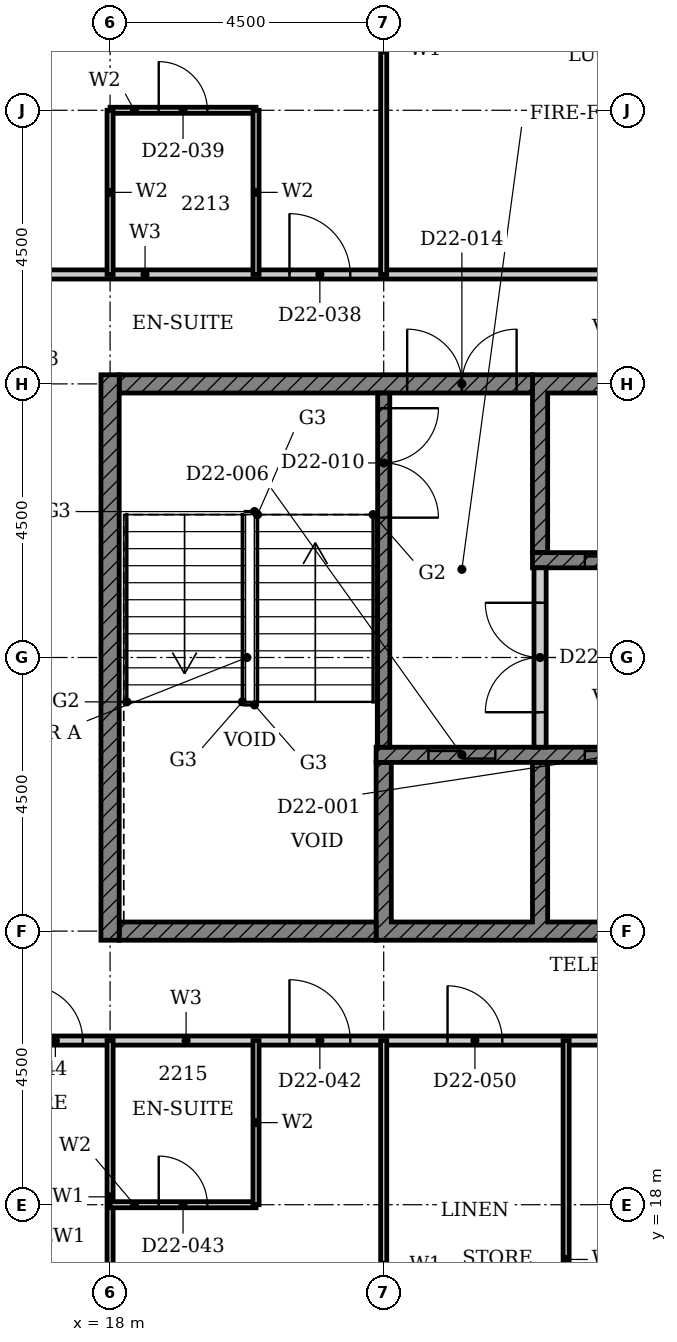
"""IFC4 building model, lengths in metres.
Left out: names, types, materials, properties, quantities, classifications, styles, units other than length and angle.
Written with IfcOpenShell. Run it as: python <this file> out.ifc"""

import sys

from ifc_helpers import new_model, si_unit, direction, frame, frame_2d, origin, place, context, subcontext, project, spatial, polyline, rectangle, outline, extrude, element, fill, save


model = new_model("IFC4")
c1 = context("Model", 3, precision=1e-05, world=origin(), true_north=direction((0.0, 1.0)))
c2 = subcontext(c1, "Body", "Model", "MODEL_VIEW")
j1 = project(units=[si_unit("LENGTHUNIT", "METRE"), si_unit("PLANEANGLEUNIT", "RADIAN")], contexts=[c1])
p1 = place(None, origin())
s1 = spatial("IfcSite", under=j1, at=p1, CompositionType="ELEMENT")
p2 = place(p1, origin())
s2 = spatial("IfcBuilding", under=s1, at=p2, CompositionType="ELEMENT")
p3 = place(p2, frame((0.0, 0.0, 92.4)))
s3 = spatial("IfcBuildingStorey", under=s2, at=p3, CompositionType="ELEMENT", Elevation=92.4)
p4 = place(p3, origin())
e1 = element("IfcWall", 1, at=p4, inside=s3, PredefinedType="SHEAR", context=c2, shape_type="SweptSolid", body=[
    extrude(outline(polyline([(22.375, 22.35), (38.053, 22.35), (38.053, 25.275), (37.803, 25.275), (37.803, 22.65), (35.482, 22.65), (35.482, 25.275), (35.232, 25.275), (35.232, 22.65), (32.911, 22.65), (32.911, 25.275), (32.661, 25.275), (32.661, 22.65), (30.339, 22.65), (30.339, 25.275), (30.089, 25.275), (30.089, 22.65), (27.768, 22.65), (27.768, 25.275), (27.518, 25.275), (27.518, 22.65), (25.197, 22.65), (25.197, 25.275), (24.947, 25.275), (24.947, 22.65), (22.625, 22.65), (22.625, 25.275), (22.375, 25.275), (22.375, 22.35)])), origin(), (0.0, 0.0, 1.0), 3.2),
])
p5 = place(p3, origin())
e2 = element("IfcWall", 2, at=p5, inside=s3, PredefinedType="SHEAR", context=c2, shape_type="SweptSolid", body=[
    extrude(outline(polyline([(24.947, 28.725), (25.197, 28.725), (25.197, 31.35), (27.518, 31.35), (27.518, 28.725), (27.768, 28.725), (27.768, 31.35), (30.089, 31.35), (30.089, 28.725), (30.339, 28.725), (30.339, 31.35), (32.661, 31.35), (32.661, 28.725), (32.911, 28.725), (32.911, 31.35), (35.232, 31.35), (35.232, 28.725), (35.482, 28.725), (35.482, 31.35), (37.803, 31.35), (37.803, 28.725), (38.053, 28.725), (38.053, 31.35), (40.375, 31.35), (40.375, 28.725), (40.625, 28.725), (40.625, 31.65), (24.947, 31.65), (24.947, 28.725)])), origin(), (0.0, 0.0, 1.0), 3.2),
])
p6 = place(p3, frame((18.15, 22.5, 0.0), z_axis=(0.0, 0.0, 1.0), x_axis=(1.0, 0.0, 0.0)))
e3 = element("IfcWall", 3, at=p6, inside=s3, PredefinedType="SHEAR", context=c2, shape_type="SweptSolid", body=[
    extrude(rectangle(XDim=4.225, YDim=0.3, at=frame_2d((2.113, 0.0))), origin(), (0.0, 0.0, 1.0), 3.2),
])
p7 = place(p3, frame((18.15, 31.5, 0.0), z_axis=(0.0, 0.0, 1.0), x_axis=(1.0, 0.0, 0.0)))
e4 = element("IfcWall", 4, at=p7, inside=s3, PredefinedType="SHEAR", context=c2, shape_type="SweptSolid", body=[
    extrude(rectangle(XDim=6.797, YDim=0.3, at=frame_2d((3.398, 0.0))), origin(), (0.0, 0.0, 1.0), 3.2),
])
p8 = place(p7, frame((4.736, 0.0, 0.0)))
e5 = element("IfcOpeningElement", 5, at=p8, cuts=e4, PredefinedType="OPENING", context=c2, shape_type="SweptSolid", body=[
    extrude(rectangle(XDim=1.8, YDim=2.1, at=frame_2d((0.9, 1.05))), frame((0.0, 0.16, 0.0), z_axis=(0.0, -1.0, 0.0), x_axis=(1.0, 0.0, 0.0)), (0.0, 0.0, 1.0), 0.32),
])
p9 = place(p3, frame((18.0, 22.35, 0.0), z_axis=(0.0, 0.0, 1.0), x_axis=(0.0, 1.0, 0.0)))
e6 = element("IfcWall", 6, at=p9, inside=s3, PredefinedType="SHEAR", context=c2, shape_type="SweptSolid", body=[
    extrude(rectangle(XDim=9.3, YDim=0.3, at=frame_2d((4.65, 0.0))), origin(), (0.0, 0.0, 1.0), 3.2),
])
p10 = place(p3, frame((22.375, 25.4, 0.0), z_axis=(0.0, 0.0, 1.0), x_axis=(1.0, 0.0, 0.0)))
e7 = element("IfcWall", 7, at=p10, inside=s3, PredefinedType="SHEAR", context=c2, shape_type="SweptSolid", body=[
    extrude(rectangle(XDim=15.678, YDim=0.25, at=frame_2d((7.839, 0.0))), origin(), (0.0, 0.0, 1.0), 3.2),
])
p11 = place(p10, frame((3.432, 0.0, 0.0)))
e8 = element("IfcOpeningElement", 8, at=p11, cuts=e7, PredefinedType="OPENING", context=c2, shape_type="SweptSolid", body=[
    extrude(rectangle(XDim=1.1, YDim=2.1, at=frame_2d((0.55, 1.05))), frame((0.0, 0.135, 0.0), z_axis=(0.0, -1.0, 0.0), x_axis=(1.0, 0.0, 0.0)), (0.0, 0.0, 1.0), 0.27),
])
p12 = place(p10, frame((11.146, 0.0, 0.0)))
e9 = element("IfcOpeningElement", 9, at=p12, cuts=e7, PredefinedType="OPENING", context=c2, shape_type="SweptSolid", body=[
    extrude(rectangle(XDim=1.1, YDim=2.1, at=frame_2d((0.55, 1.05))), frame((0.0, 0.135, 0.0), z_axis=(0.0, -1.0, 0.0), x_axis=(1.0, 0.0, 0.0)), (0.0, 0.0, 1.0), 0.27),
])
p13 = place(p10, frame((13.718, 0.0, 0.0)))
e10 = element("IfcOpeningElement", 10, at=p13, cuts=e7, PredefinedType="OPENING", context=c2, shape_type="SweptSolid", body=[
    extrude(rectangle(XDim=1.1, YDim=2.1, at=frame_2d((0.55, 1.05))), frame((0.0, 0.135, 0.0), z_axis=(0.0, -1.0, 0.0), x_axis=(1.0, 0.0, 0.0)), (0.0, 0.0, 1.0), 0.27),
])
p14 = place(p10, frame((0.861, 0.0, 0.0)))
e11 = element("IfcOpeningElement", 11, at=p14, cuts=e7, PredefinedType="OPENING", context=c2, shape_type="SweptSolid", body=[
    extrude(rectangle(XDim=1.1, YDim=2.1, at=frame_2d((0.55, 1.05))), frame((0.0, 0.135, 0.0), z_axis=(0.0, -1.0, 0.0), x_axis=(1.0, 0.0, 0.0)), (0.0, 0.0, 1.0), 0.27),
])
p15 = place(p3, frame((24.947, 28.6, 0.0), z_axis=(0.0, 0.0, 1.0), x_axis=(1.0, 0.0, 0.0)))
e12 = element("IfcWall", 12, at=p15, inside=s3, PredefinedType="SHEAR", context=c2, shape_type="SweptSolid", body=[
    extrude(rectangle(XDim=15.678, YDim=0.25, at=frame_2d((7.839, 0.0))), origin(), (0.0, 0.0, 1.0), 3.2),
])
p16 = place(p15, frame((0.861, 0.0, 0.0)))
e13 = element("IfcOpeningElement", 13, at=p16, cuts=e12, PredefinedType="OPENING", context=c2, shape_type="SweptSolid", body=[
    extrude(rectangle(XDim=1.1, YDim=2.1, at=frame_2d((0.55, 1.05))), frame((0.0, 0.135, 0.0), z_axis=(0.0, -1.0, 0.0), x_axis=(1.0, 0.0, 0.0)), (0.0, 0.0, 1.0), 0.27),
])
p17 = place(p15, frame((8.575, 0.0, 0.0)))
e14 = element("IfcOpeningElement", 14, at=p17, cuts=e12, PredefinedType="OPENING", context=c2, shape_type="SweptSolid", body=[
    extrude(rectangle(XDim=1.1, YDim=2.1, at=frame_2d((0.55, 1.05))), frame((0.0, 0.135, 0.0), z_axis=(0.0, -1.0, 0.0), x_axis=(1.0, 0.0, 0.0)), (0.0, 0.0, 1.0), 0.27),
])
p18 = place(p15, frame((13.718, 0.0, 0.0)))
e15 = element("IfcOpeningElement", 15, at=p18, cuts=e12, PredefinedType="OPENING", context=c2, shape_type="SweptSolid", body=[
    extrude(rectangle(XDim=1.1, YDim=2.1, at=frame_2d((0.55, 1.05))), frame((0.0, 0.135, 0.0), z_axis=(0.0, -1.0, 0.0), x_axis=(1.0, 0.0, 0.0)), (0.0, 0.0, 1.0), 0.27),
])
p19 = place(p3, frame((22.5, 31.35, 0.0), z_axis=(0.0, 0.0, 1.0), x_axis=(0.0, -1.0, 0.0)))
e16 = element("IfcWall", 16, at=p19, inside=s3, PredefinedType="SHEAR", context=c2, shape_type="SweptSolid", body=[
    extrude(rectangle(XDim=5.825, YDim=0.2, at=frame_2d((2.913, 0.0))), origin(), (0.0, 0.0, 1.0), 3.2),
])
p20 = place(p19, frame((0.25, 0.0, 0.0)))
e17 = element("IfcOpeningElement", 17, at=p20, cuts=e16, PredefinedType="OPENING", context=c2, shape_type="SweptSolid", body=[
    extrude(rectangle(XDim=1.8, YDim=2.1, at=frame_2d((0.9, 1.05))), frame((0.0, 0.11, 0.0), z_axis=(0.0, -1.0, 0.0), x_axis=(1.0, 0.0, 0.0)), (0.0, 0.0, 1.0), 0.22),
])
p21 = place(p3, frame((25.072, 25.525, 0.0), z_axis=(0.0, 0.0, 1.0), x_axis=(0.0, 1.0, 0.0)))
e18 = element("IfcWall", 18, at=p21, inside=s3, PredefinedType="PARTITIONING", context=c2, shape_type="SweptSolid", body=[
    extrude(rectangle(XDim=2.95, YDim=0.2, at=frame_2d((1.475, 0.0))), origin(), (0.0, 0.0, 1.0), 3.2),
])
p22 = place(p21, frame((0.575, 0.0, 0.0)))
e19 = element("IfcOpeningElement", 19, at=p22, cuts=e18, PredefinedType="OPENING", context=c2, shape_type="SweptSolid", body=[
    extrude(rectangle(XDim=1.8, YDim=2.1, at=frame_2d((0.9, 1.05))), frame((0.0, 0.11, 0.0), z_axis=(0.0, -1.0, 0.0), x_axis=(1.0, 0.0, 0.0)), (0.0, 0.0, 1.0), 0.22),
])
p23 = place(p3, frame((16.2, 20.7, 0.0), z_axis=(0.0, 0.0, 1.0), x_axis=(1.0, 0.0, 0.0)))
e20 = element("IfcWall", 20, at=p23, inside=s3, PredefinedType="PARTITIONING", context=c2, shape_type="SweptSolid", body=[
    extrude(rectangle(XDim=13.5, YDim=0.15, at=frame_2d((6.75, 0.0))), origin(), (0.0, 0.0, 1.0), 3.2),
])
p24 = place(p23, frame((4.75, 0.0, 0.0)))
e21 = element("IfcOpeningElement", 21, at=p24, cuts=e20, PredefinedType="OPENING", context=c2, shape_type="SweptSolid", body=[
    extrude(rectangle(XDim=1.0, YDim=2.1, at=frame_2d((0.5, 1.05))), frame((0.0, 0.085, 0.0), z_axis=(0.0, -1.0, 0.0), x_axis=(1.0, 0.0, 0.0)), (0.0, 0.0, 1.0), 0.17),
])
p25 = place(p23, frame((0.45, 0.0, 0.0)))
e22 = element("IfcOpeningElement", 22, at=p25, cuts=e20, PredefinedType="OPENING", context=c2, shape_type="SweptSolid", body=[
    extrude(rectangle(XDim=0.9, YDim=2.1, at=frame_2d((0.45, 1.05))), frame((0.0, 0.085, 0.0), z_axis=(0.0, -1.0, 0.0), x_axis=(1.0, 0.0, 0.0)), (0.0, 0.0, 1.0), 0.17),
])
p26 = place(p23, frame((7.35, 0.0, 0.0)))
e23 = element("IfcOpeningElement", 23, at=p26, cuts=e20, PredefinedType="OPENING", context=c2, shape_type="SweptSolid", body=[
    extrude(rectangle(XDim=0.9, YDim=2.1, at=frame_2d((0.45, 1.05))), frame((0.0, 0.085, 0.0), z_axis=(0.0, -1.0, 0.0), x_axis=(1.0, 0.0, 0.0)), (0.0, 0.0, 1.0), 0.17),
])
p27 = place(p23, frame((10.95, 0.0, 0.0)))
e24 = element("IfcOpeningElement", 24, at=p27, cuts=e20, PredefinedType="OPENING", context=c2, shape_type="SweptSolid", body=[
    extrude(rectangle(XDim=0.9, YDim=2.1, at=frame_2d((0.45, 1.05))), frame((0.0, 0.085, 0.0), z_axis=(0.0, -1.0, 0.0), x_axis=(1.0, 0.0, 0.0)), (0.0, 0.0, 1.0), 0.17),
])
p28 = place(p3, frame((16.2, 33.3, 0.0), z_axis=(0.0, 0.0, 1.0), x_axis=(1.0, 0.0, 0.0)))
e25 = element("IfcWall", 25, at=p28, inside=s3, PredefinedType="PARTITIONING", context=c2, shape_type="SweptSolid", body=[
    extrude(rectangle(XDim=15.3, YDim=0.15, at=frame_2d((7.65, 0.0))), origin(), (0.0, 0.0, 1.0), 3.2),
])
p29 = place(p28, frame((4.75, 0.0, 0.0)))
e26 = element("IfcOpeningElement", 26, at=p29, cuts=e25, PredefinedType="OPENING", context=c2, shape_type="SweptSolid", body=[
    extrude(rectangle(XDim=1.0, YDim=2.1, at=frame_2d((0.5, 1.05))), frame((0.0, 0.085, 0.0), z_axis=(0.0, -1.0, 0.0), x_axis=(1.0, 0.0, 0.0)), (0.0, 0.0, 1.0), 0.17),
])
p30 = place(p28, frame((10.35, 0.0, 0.0)))
e27 = element("IfcOpeningElement", 27, at=p30, cuts=e25, PredefinedType="OPENING", context=c2, shape_type="SweptSolid", body=[
    extrude(rectangle(XDim=0.9, YDim=2.1, at=frame_2d((0.45, 1.05))), frame((0.0, 0.085, 0.0), z_axis=(0.0, -1.0, 0.0), x_axis=(1.0, 0.0, 0.0)), (0.0, 0.0, 1.0), 0.17),
])
p31 = place(p3, frame((18.0, 15.56, 0.0), z_axis=(0.0, 0.0, 1.0), x_axis=(0.0, 1.0, 0.0)))
e28 = element("IfcWall", 28, at=p31, inside=s3, PredefinedType="PARTITIONING", context=c2, shape_type="SweptSolid", body=[
    extrude(rectangle(XDim=5.14, YDim=0.1, at=frame_2d((2.57, 0.0))), origin(), (0.0, 0.0, 1.0), 3.2),
])
for number, where, z_axis, x_axis in (
    (29, (22.5, 33.3, 0.0), (0.0, 0.0, 1.0), (0.0, 1.0, 0.0)),
    (30, (22.5, 13.31, 0.0), (0.0, 0.0, 1.0), (0.0, 1.0, 0.0)),
):
    element("IfcWall", number, at=place(p3, frame(where, z_axis=z_axis, x_axis=x_axis)), inside=s3, PredefinedType="PARTITIONING", context=c2, shape_type="SweptSolid", body=[
        extrude(rectangle(XDim=7.39, YDim=0.1, at=frame_2d((3.695, 0.0))), origin(), (0.0, 0.0, 1.0), 3.2),
    ])
p32 = place(p3, frame((25.5, 13.5, 0.0), z_axis=(0.0, 0.0, 1.0), x_axis=(0.0, 1.0, 0.0)))
e31 = element("IfcWall", 31, at=p32, inside=s3, PredefinedType="PARTITIONING", context=c2, shape_type="SweptSolid", body=[
    extrude(rectangle(XDim=7.2, YDim=0.1, at=frame_2d((3.6, 0.0))), origin(), (0.0, 0.0, 1.0), 3.2),
])
p33 = place(p3, frame((18.0, 18.0, 0.0), z_axis=(0.0, 0.0, 1.0), x_axis=(1.0, 0.0, 0.0)))
e32 = element("IfcWall", 32, at=p33, inside=s3, PredefinedType="PARTITIONING", context=c2, shape_type="SweptSolid", body=[
    extrude(rectangle(XDim=2.4, YDim=0.1, at=frame_2d((1.2, 0.0))), origin(), (0.0, 0.0, 1.0), 3.2),
])
p34 = place(p33, frame((0.8, 0.0, 0.0)))
e33 = element("IfcOpeningElement", 33, at=p34, cuts=e32, PredefinedType="OPENING", context=c2, shape_type="SweptSolid", body=[
    extrude(rectangle(XDim=0.8, YDim=2.1, at=frame_2d((0.4, 1.05))), frame((0.0, 0.06, 0.0), z_axis=(0.0, -1.0, 0.0), x_axis=(1.0, 0.0, 0.0)), (0.0, 0.0, 1.0), 0.12),
])
p35 = place(p3, frame((18.0, 36.0, 0.0), z_axis=(0.0, 0.0, 1.0), x_axis=(1.0, 0.0, 0.0)))
e34 = element("IfcWall", 34, at=p35, inside=s3, PredefinedType="PARTITIONING", context=c2, shape_type="SweptSolid", body=[
    extrude(rectangle(XDim=2.4, YDim=0.1, at=frame_2d((1.2, 0.0))), origin(), (0.0, 0.0, 1.0), 3.2),
])
p36 = place(p35, frame((0.8, 0.0, 0.0)))
e35 = element("IfcOpeningElement", 35, at=p36, cuts=e34, PredefinedType="OPENING", context=c2, shape_type="SweptSolid", body=[
    extrude(rectangle(XDim=0.8, YDim=2.1, at=frame_2d((0.4, 1.05))), frame((0.0, 0.06, 0.0), z_axis=(0.0, -1.0, 0.0), x_axis=(1.0, 0.0, 0.0)), (0.0, 0.0, 1.0), 0.12),
])
for number, where, z_axis, x_axis in (
    (36, (18.0, 33.3, 0.0), (0.0, 0.0, 1.0), (0.0, 1.0, 0.0)),
    (37, (20.4, 33.3, 0.0), (0.0, 0.0, 1.0), (0.0, 1.0, 0.0)),
    (38, (20.4, 18.0, 0.0), (0.0, 0.0, 1.0), (0.0, 1.0, 0.0)),
):
    element("IfcWall", number, at=place(p3, frame(where, z_axis=z_axis, x_axis=x_axis)), inside=s3, PredefinedType="PARTITIONING", context=c2, shape_type="SweptSolid", body=[
        extrude(rectangle(XDim=2.7, YDim=0.1, at=frame_2d((1.35, 0.0))), origin(), (0.0, 0.0, 1.0), 3.2),
    ])
p37 = place(p11, origin())
e39 = element("IfcDoor", 39, at=p37, inside=s3, OperationType="DOUBLE_DOOR_SLIDING", PredefinedType="DOOR", context=c2, shape_type="SweptSolid", body=[
    extrude(rectangle(XDim=1.1, YDim=2.1, at=frame_2d((0.55, 1.05))), frame((0.0, 0.025, 0.0), z_axis=(0.0, -1.0, 0.0), x_axis=(1.0, 0.0, 0.0)), (0.0, 0.0, 1.0), 0.05),
])
fill(e8, e39)
p38 = place(p16, origin())
e40 = element("IfcDoor", 40, at=p38, inside=s3, OperationType="DOUBLE_DOOR_SLIDING", PredefinedType="DOOR", context=c2, shape_type="SweptSolid", body=[
    extrude(rectangle(XDim=1.1, YDim=2.1, at=frame_2d((0.55, 1.05))), frame((0.0, 0.025, 0.0), z_axis=(0.0, -1.0, 0.0), x_axis=(1.0, 0.0, 0.0)), (0.0, 0.0, 1.0), 0.05),
])
fill(e13, e40)
p39 = place(p14, origin())
e41 = element("IfcDoor", 41, at=p39, inside=s3, OperationType="DOUBLE_DOOR_SLIDING", PredefinedType="DOOR", context=c2, shape_type="SweptSolid", body=[
    extrude(rectangle(XDim=1.1, YDim=2.1, at=frame_2d((0.55, 1.05))), frame((0.0, 0.025, 0.0), z_axis=(0.0, -1.0, 0.0), x_axis=(1.0, 0.0, 0.0)), (0.0, 0.0, 1.0), 0.05),
])
fill(e11, e41)
p40 = place(p20, origin())
e42 = element("IfcDoor", 42, at=p40, inside=s3, OperationType="DOUBLE_DOOR_SINGLE_SWING", PredefinedType="DOOR", context=c2, shape_type="SweptSolid", body=[
    extrude(rectangle(XDim=1.8, YDim=2.1, at=frame_2d((0.9, 1.05))), frame((0.0, 0.025, 0.0), z_axis=(0.0, -1.0, 0.0), x_axis=(1.0, 0.0, 0.0)), (0.0, 0.0, 1.0), 0.05),
])
fill(e17, e42)
p41 = place(p22, origin())
e43 = element("IfcDoor", 43, at=p41, inside=s3, OperationType="DOUBLE_DOOR_SINGLE_SWING", PredefinedType="DOOR", context=c2, shape_type="SweptSolid", body=[
    extrude(rectangle(XDim=1.8, YDim=2.1, at=frame_2d((0.9, 1.05))), frame((0.0, 0.025, 0.0), z_axis=(0.0, -1.0, 0.0), x_axis=(1.0, 0.0, 0.0)), (0.0, 0.0, 1.0), 0.05),
])
fill(e19, e43)
p42 = place(p8, origin())
e44 = element("IfcDoor", 44, at=p42, inside=s3, OperationType="DOUBLE_DOOR_SINGLE_SWING", PredefinedType="DOOR", context=c2, shape_type="SweptSolid", body=[
    extrude(rectangle(XDim=1.8, YDim=2.1, at=frame_2d((0.9, 1.05))), frame((0.0, 0.025, 0.0), z_axis=(0.0, -1.0, 0.0), x_axis=(1.0, 0.0, 0.0)), (0.0, 0.0, 1.0), 0.05),
])
fill(e5, e44)
p43 = place(p29, origin())
e45 = element("IfcDoor", 45, at=p43, inside=s3, OperationType="SINGLE_SWING_RIGHT", PredefinedType="DOOR", context=c2, shape_type="SweptSolid", body=[
    extrude(rectangle(XDim=1.0, YDim=2.1, at=frame_2d((0.5, 1.05))), frame((0.0, 0.025, 0.0), z_axis=(0.0, -1.0, 0.0), x_axis=(1.0, 0.0, 0.0)), (0.0, 0.0, 1.0), 0.05),
])
fill(e26, e45)
p44 = place(p36, origin())
e46 = element("IfcDoor", 46, at=p44, inside=s3, OperationType="SINGLE_SWING_LEFT", PredefinedType="DOOR", context=c2, shape_type="SweptSolid", body=[
    extrude(rectangle(XDim=0.8, YDim=2.1, at=frame_2d((0.4, 1.05))), frame((0.0, 0.025, 0.0), z_axis=(0.0, -1.0, 0.0), x_axis=(1.0, 0.0, 0.0)), (0.0, 0.0, 1.0), 0.05),
])
fill(e35, e46)
p45 = place(p24, origin())
e47 = element("IfcDoor", 47, at=p45, inside=s3, OperationType="SINGLE_SWING_RIGHT", PredefinedType="DOOR", context=c2, shape_type="SweptSolid", body=[
    extrude(rectangle(XDim=1.0, YDim=2.1, at=frame_2d((0.5, 1.05))), frame((0.0, 0.025, 0.0), z_axis=(0.0, -1.0, 0.0), x_axis=(1.0, 0.0, 0.0)), (0.0, 0.0, 1.0), 0.05),
])
fill(e21, e47)
p46 = place(p34, origin())
e48 = element("IfcDoor", 48, at=p46, inside=s3, OperationType="SINGLE_SWING_LEFT", PredefinedType="DOOR", context=c2, shape_type="SweptSolid", body=[
    extrude(rectangle(XDim=0.8, YDim=2.1, at=frame_2d((0.4, 1.05))), frame((0.0, 0.025, 0.0), z_axis=(0.0, -1.0, 0.0), x_axis=(1.0, 0.0, 0.0)), (0.0, 0.0, 1.0), 0.05),
])
fill(e33, e48)
p47 = place(p25, origin())
e49 = element("IfcDoor", 49, at=p47, inside=s3, OperationType="SINGLE_SWING_RIGHT", PredefinedType="DOOR", context=c2, shape_type="SweptSolid", body=[
    extrude(rectangle(XDim=0.9, YDim=2.1, at=frame_2d((0.45, 1.05))), frame((0.0, 0.025, 0.0), z_axis=(0.0, -1.0, 0.0), x_axis=(1.0, 0.0, 0.0)), (0.0, 0.0, 1.0), 0.05),
])
fill(e22, e49)
p48 = place(p26, origin())
e50 = element("IfcDoor", 50, at=p48, inside=s3, OperationType="SINGLE_SWING_RIGHT", PredefinedType="DOOR", context=c2, shape_type="SweptSolid", body=[
    extrude(rectangle(XDim=0.9, YDim=2.1, at=frame_2d((0.45, 1.05))), frame((0.0, 0.025, 0.0), z_axis=(0.0, -1.0, 0.0), x_axis=(1.0, 0.0, 0.0)), (0.0, 0.0, 1.0), 0.05),
])
fill(e23, e50)
save(model, sys.argv[1])
